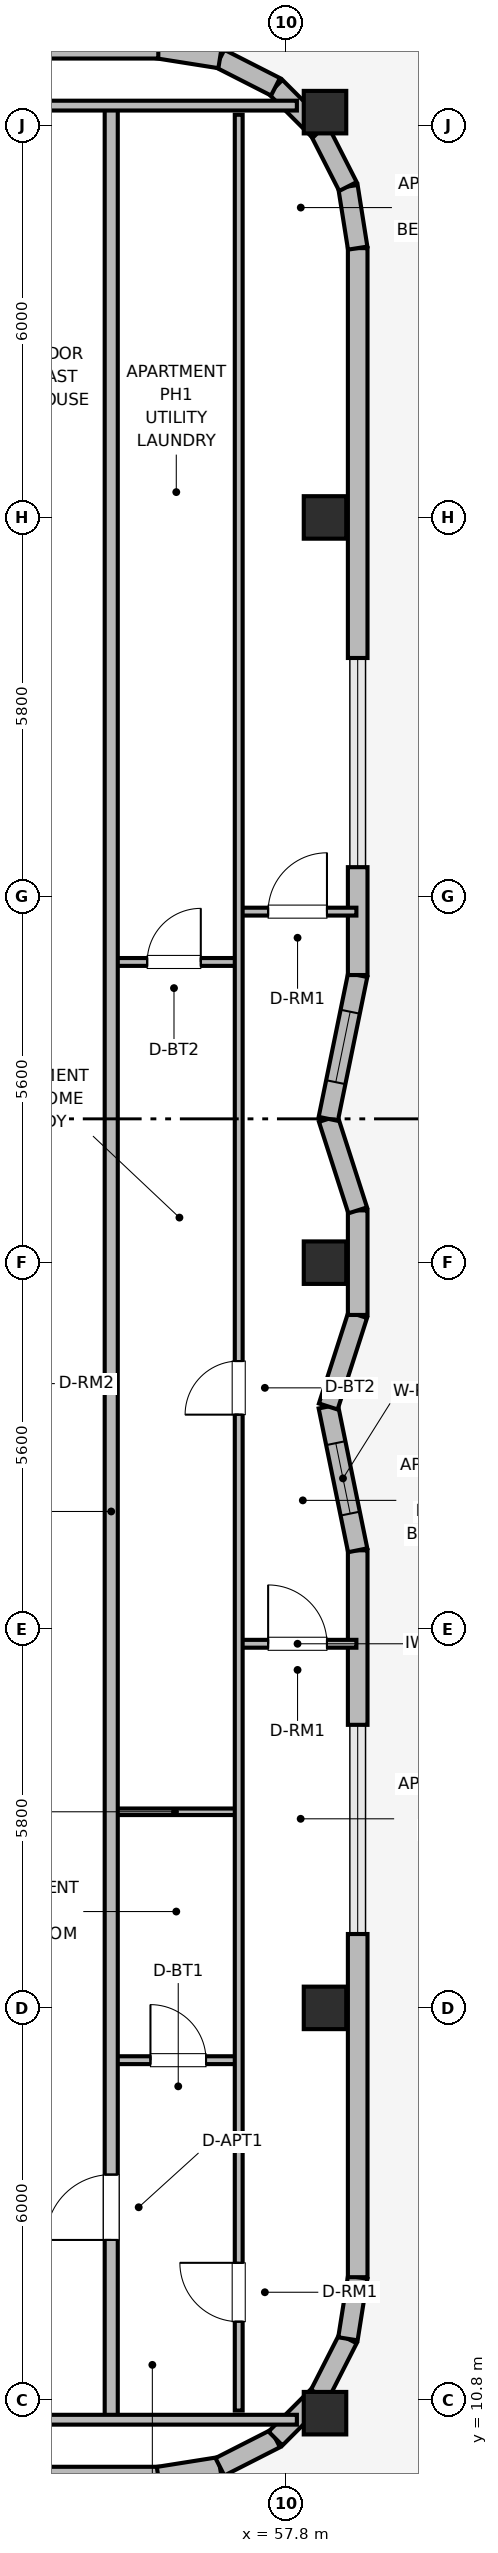
"""IFC4 building model, lengths in metres.
Left out: names, types, materials, properties, quantities, classifications, styles, units other than length and angle.
Written with IfcOpenShell. Run it as: python <this file> out.ifc"""

import sys

from ifc_helpers import new_model, si_unit, direction, frame, frame_2d, origin, origin_2d, place, context, subcontext, project, spatial, rectangle, extrude, element, fill, save


model = new_model("IFC4")
c1 = context("Model", 3, precision=1e-05, world=origin(), true_north=direction((0.0, 1.0)))
c2 = subcontext(c1, "Body", "Model", "MODEL_VIEW")
j1 = project(units=[si_unit("LENGTHUNIT", "METRE"), si_unit("PLANEANGLEUNIT", "RADIAN")], contexts=[c1])
p1 = place(None, origin())
s1 = spatial("IfcSite", under=j1, at=p1, CompositionType="ELEMENT")
p2 = place(p1, origin())
s2 = spatial("IfcBuilding", under=s1, at=p2, CompositionType="ELEMENT")
p3 = place(p2, frame((0.0, 0.0, 297.2)))
s3 = spatial("IfcBuildingStorey", under=s2, at=p3, CompositionType="ELEMENT", Elevation=297.2)
for number, where, z_axis, x_axis in (
    (1, (58.39, 10.6, 0.0), (0.0, 0.0, 1.0), (1.0, 0.0, 0.0)),
    (2, (58.39, 16.8, 0.0), (0.0, 0.0, 1.0), (1.0, 0.0, 0.0)),
    (3, (58.39, 28.2, 0.0), (0.0, 0.0, 1.0), (1.0, 0.0, 0.0)),
    (4, (58.39, 39.6, 0.0), (0.0, 0.0, 1.0), (1.0, 0.0, 0.0)),
    (5, (58.39, 45.8, 0.0), (0.0, 0.0, 1.0), (1.0, 0.0, 0.0)),
):
    element("IfcColumn", number, at=place(p3, frame(where, z_axis=z_axis, x_axis=x_axis)), inside=s3, PredefinedType="COLUMN", context=c2, shape_type="SweptSolid", body=[
        extrude(rectangle(XDim=0.65, YDim=0.65, at=origin_2d()), origin(), (0.0, 0.0, 1.0), 4.8),
    ])
p4 = place(p3, frame((30.21, 9.63, 0.0), z_axis=(0.0, 0.0, 1.0), x_axis=(1.0, 0.0, 0.0)))
e6 = element("IfcWall", 6, at=p4, inside=s3, PredefinedType="SOLIDWALL", context=c2, shape_type="SweptSolid", body=[
    extrude(rectangle(XDim=25.63, YDim=0.3, at=frame_2d((12.815, 0.0))), origin(), (0.0, 0.0, 1.0), 2.6),
])
p5 = place(p4, frame((1.228, 0.0, 0.38)))
e7 = element("IfcOpeningElement", 7, at=p5, cuts=e6, PredefinedType="OPENING", context=c2, shape_type="SweptSolid", body=[
    extrude(rectangle(XDim=2.2, YDim=2.1, at=frame_2d((1.1, 1.05))), frame((0.0, 0.16, 0.0), z_axis=(0.0, -1.0, 0.0), x_axis=(1.0, 0.0, 0.0)), (0.0, 0.0, 1.0), 0.32),
])
p6 = place(p4, frame((6.333, 0.0, 0.38)))
e8 = element("IfcOpeningElement", 8, at=p6, cuts=e6, PredefinedType="OPENING", context=c2, shape_type="SweptSolid", body=[
    extrude(rectangle(XDim=2.2, YDim=2.1, at=frame_2d((1.1, 1.05))), frame((0.0, 0.16, 0.0), z_axis=(0.0, -1.0, 0.0), x_axis=(1.0, 0.0, 0.0)), (0.0, 0.0, 1.0), 0.32),
])
p7 = place(p4, frame((9.337, 0.0, 0.38)))
e9 = element("IfcOpeningElement", 9, at=p7, cuts=e6, PredefinedType="OPENING", context=c2, shape_type="SweptSolid", body=[
    extrude(rectangle(XDim=2.2, YDim=2.1, at=frame_2d((1.1, 1.05))), frame((0.0, 0.16, 0.0), z_axis=(0.0, -1.0, 0.0), x_axis=(1.0, 0.0, 0.0)), (0.0, 0.0, 1.0), 0.32),
])
p8 = place(p4, frame((14.442, 0.0, 0.38)))
e10 = element("IfcOpeningElement", 10, at=p8, cuts=e6, PredefinedType="OPENING", context=c2, shape_type="SweptSolid", body=[
    extrude(rectangle(XDim=2.2, YDim=2.1, at=frame_2d((1.1, 1.05))), frame((0.0, 0.16, 0.0), z_axis=(0.0, -1.0, 0.0), x_axis=(1.0, 0.0, 0.0)), (0.0, 0.0, 1.0), 0.32),
])
p9 = place(p4, frame((17.798, 0.0, 0.38)))
e11 = element("IfcOpeningElement", 11, at=p9, cuts=e6, PredefinedType="OPENING", context=c2, shape_type="SweptSolid", body=[
    extrude(rectangle(XDim=2.2, YDim=2.1, at=frame_2d((1.1, 1.05))), frame((0.0, 0.16, 0.0), z_axis=(0.0, -1.0, 0.0), x_axis=(1.0, 0.0, 0.0)), (0.0, 0.0, 1.0), 0.32),
])
p10 = place(p3, frame((55.84, 9.63, 0.0), z_axis=(0.0, 0.0, 1.0), x_axis=(0.987663181641, 0.156593229835, 0.0)))
e12 = element("IfcWall", 12, at=p10, inside=s3, PredefinedType="SOLIDWALL", context=c2, shape_type="SweptSolid", body=[
    extrude(rectangle(XDim=0.954, YDim=0.3, at=frame_2d((0.477, 0.0))), origin(), (0.0, 0.0, 1.0), 2.6),
])
for number, where, z_axis, x_axis in (
    (13, (56.782, 9.779, 0.0), (0.0, 0.0, 1.0), (0.891, 0.454, 0.0)),
    (14, (57.633, 10.212, 0.0), (0.0, 0.0, 1.0), (0.707, 0.707, 0.0)),
    (15, (58.308, 10.887, 0.0), (0.0, 0.0, 1.0), (0.454, 0.891, 0.0)),
):
    element("IfcWall", number, at=place(p3, frame(where, z_axis=z_axis, x_axis=x_axis)), inside=s3, PredefinedType="SOLIDWALL", context=c2, shape_type="SweptSolid", body=[
        extrude(rectangle(XDim=0.954, YDim=0.3, at=frame_2d((0.477, 0.0))), origin(), (0.0, 0.0, 1.0), 2.6),
    ])
p11 = place(p3, frame((58.741, 11.738, 0.0), z_axis=(0.0, 0.0, 1.0), x_axis=(0.156343617883, 0.987702725088, 0.0)))
e16 = element("IfcWall", 16, at=p11, inside=s3, PredefinedType="SOLIDWALL", context=c2, shape_type="SweptSolid", body=[
    extrude(rectangle(XDim=0.954, YDim=0.3, at=frame_2d((0.477, 0.0))), origin(), (0.0, 0.0, 1.0), 2.6),
])
p12 = place(p3, frame((58.89, 12.68, 0.0), z_axis=(0.0, 0.0, 1.0), x_axis=(0.0, 1.0, 0.0)))
e17 = element("IfcWall", 17, at=p12, inside=s3, PredefinedType="SOLIDWALL", context=c2, shape_type="SweptSolid", body=[
    extrude(rectangle(XDim=5.25, YDim=0.3, at=frame_2d((2.625, 0.0))), origin(), (0.0, 0.0, 1.0), 2.6),
])
p13 = place(p3, frame((58.89, 21.13, 0.0), z_axis=(0.0, 0.0, 1.0), x_axis=(0.0, 1.0, 0.0)))
e18 = element("IfcWall", 18, at=p13, inside=s3, PredefinedType="SOLIDWALL", context=c2, shape_type="SweptSolid", body=[
    extrude(rectangle(XDim=2.67, YDim=0.3, at=frame_2d((1.335, 0.0))), origin(), (0.0, 0.0, 1.0), 2.6),
])
p14 = place(p3, frame((58.89, 23.8, 0.0), z_axis=(0.0, 0.0, 1.0), x_axis=(-0.200379633636, 0.979718328104, 0.0)))
e19 = element("IfcWall", 19, at=p14, inside=s3, PredefinedType="SOLIDWALL", context=c2, shape_type="SweptSolid", body=[
    extrude(rectangle(XDim=2.246, YDim=0.3, at=frame_2d((1.123, 0.0))), origin(), (0.0, 0.0, 1.0), 2.6),
])
p15 = place(p14, frame((0.573, 0.0, 0.79)))
e20 = element("IfcOpeningElement", 20, at=p15, cuts=e19, PredefinedType="OPENING", context=c2, shape_type="SweptSolid", body=[
    extrude(rectangle(XDim=1.1, YDim=1.65, at=frame_2d((0.55, 0.825))), frame((0.0, 0.16, 0.0), z_axis=(0.0, -1.0, 0.0), x_axis=(1.0, 0.0, 0.0)), (0.0, 0.0, 1.0), 0.32),
])
p16 = place(p3, frame((58.44, 26.0, 0.0), z_axis=(0.0, 0.0, 1.0), x_axis=(0.30599843145, 0.952032016242, 0.0)))
e21 = element("IfcWall", 21, at=p16, inside=s3, PredefinedType="SOLIDWALL", context=c2, shape_type="SweptSolid", body=[
    extrude(rectangle(XDim=1.47, YDim=0.3, at=frame_2d((0.735, 0.0))), origin(), (0.0, 0.0, 1.0), 2.6),
])
p17 = place(p3, frame((58.89, 27.4, 0.0), z_axis=(0.0, 0.0, 1.0), x_axis=(0.0, 1.0, 0.0)))
e22 = element("IfcWall", 22, at=p17, inside=s3, PredefinedType="SOLIDWALL", context=c2, shape_type="SweptSolid", body=[
    extrude(rectangle(XDim=1.6, YDim=0.3, at=frame_2d((0.8, 0.0))), origin(), (0.0, 0.0, 1.0), 2.6),
])
p18 = place(p3, frame((58.89, 29.0, 0.0), z_axis=(0.0, 0.0, 1.0), x_axis=(-0.30599843145, 0.952032016242, 0.0)))
e23 = element("IfcWall", 23, at=p18, inside=s3, PredefinedType="SOLIDWALL", context=c2, shape_type="SweptSolid", body=[
    extrude(rectangle(XDim=1.47, YDim=0.3, at=frame_2d((0.735, 0.0))), origin(), (0.0, 0.0, 1.0), 2.6),
])
p19 = place(p3, frame((58.44, 30.4, 0.0), z_axis=(0.0, 0.0, 1.0), x_axis=(0.200358291506, 0.979722692921, 0.0)))
e24 = element("IfcWall", 24, at=p19, inside=s3, PredefinedType="SOLIDWALL", context=c2, shape_type="SweptSolid", body=[
    extrude(rectangle(XDim=2.246, YDim=0.3, at=frame_2d((1.123, 0.0))), origin(), (0.0, 0.0, 1.0), 2.6),
])
p20 = place(p19, frame((0.573, 0.0, 0.79)))
e25 = element("IfcOpeningElement", 25, at=p20, cuts=e24, PredefinedType="OPENING", context=c2, shape_type="SweptSolid", body=[
    extrude(rectangle(XDim=1.1, YDim=1.65, at=frame_2d((0.55, 0.825))), frame((0.0, 0.16, 0.0), z_axis=(0.0, -1.0, 0.0), x_axis=(1.0, 0.0, 0.0)), (0.0, 0.0, 1.0), 0.32),
])
p21 = place(p3, frame((58.89, 32.6, 0.0), z_axis=(0.0, 0.0, 1.0), x_axis=(0.0, 1.0, 0.0)))
e26 = element("IfcWall", 26, at=p21, inside=s3, PredefinedType="SOLIDWALL", context=c2, shape_type="SweptSolid", body=[
    extrude(rectangle(XDim=1.65, YDim=0.3, at=frame_2d((0.825, 0.0))), origin(), (0.0, 0.0, 1.0), 2.6),
])
p22 = place(p3, frame((58.89, 37.45, 0.0), z_axis=(0.0, 0.0, 1.0), x_axis=(0.0, 1.0, 0.0)))
e27 = element("IfcWall", 27, at=p22, inside=s3, PredefinedType="SOLIDWALL", context=c2, shape_type="SweptSolid", body=[
    extrude(rectangle(XDim=6.27, YDim=0.3, at=frame_2d((3.135, 0.0))), origin(), (0.0, 0.0, 1.0), 2.6),
])
p23 = place(p3, frame((58.89, 43.72, 0.0), z_axis=(0.0, 0.0, 1.0), x_axis=(-0.156304114255, 0.987708977314, 0.0)))
e28 = element("IfcWall", 28, at=p23, inside=s3, PredefinedType="SOLIDWALL", context=c2, shape_type="SweptSolid", body=[
    extrude(rectangle(XDim=0.954, YDim=0.3, at=frame_2d((0.477, 0.0))), origin(), (0.0, 0.0, 1.0), 2.6),
])
p24 = place(p3, frame((58.741, 44.663, 0.0), z_axis=(0.0, 0.0, 1.0), x_axis=(-0.45395644796, 0.891023873617, 0.0)))
e29 = element("IfcWall", 29, at=p24, inside=s3, PredefinedType="SOLIDWALL", context=c2, shape_type="SweptSolid", body=[
    extrude(rectangle(XDim=0.954, YDim=0.3, at=frame_2d((0.477, 0.0))), origin(), (0.0, 0.0, 1.0), 2.6),
])
for number, where, z_axis, x_axis in (
    (30, (58.308, 45.513, 0.0), (0.0, 0.0, 1.0), (-0.707, 0.707, 0.0)),
    (31, (57.633, 46.188, 0.0), (0.0, 0.0, 1.0), (-0.891, 0.454, 0.0)),
):
    element("IfcWall", number, at=place(p3, frame(where, z_axis=z_axis, x_axis=x_axis)), inside=s3, PredefinedType="SOLIDWALL", context=c2, shape_type="SweptSolid", body=[
        extrude(rectangle(XDim=0.954, YDim=0.3, at=frame_2d((0.477, 0.0))), origin(), (0.0, 0.0, 1.0), 2.6),
    ])
p25 = place(p3, frame((56.782, 46.621, 0.0), z_axis=(0.0, 0.0, 1.0), x_axis=(-0.987663181641, 0.156593229835, 0.0)))
e32 = element("IfcWall", 32, at=p25, inside=s3, PredefinedType="SOLIDWALL", context=c2, shape_type="SweptSolid", body=[
    extrude(rectangle(XDim=0.954, YDim=0.3, at=frame_2d((0.477, 0.0))), origin(), (0.0, 0.0, 1.0), 2.6),
])
p26 = place(p3, frame((55.84, 46.77, 0.0), z_axis=(0.0, 0.0, 1.0), x_axis=(-1.0, 0.0, 0.0)))
e33 = element("IfcWall", 33, at=p26, inside=s3, PredefinedType="SOLIDWALL", context=c2, shape_type="SweptSolid", body=[
    extrude(rectangle(XDim=4.45, YDim=0.3, at=frame_2d((2.225, 0.0))), origin(), (0.0, 0.0, 1.0), 2.6),
])
p27 = place(p3, frame((55.12, 16.0, 0.0), z_axis=(0.0, 0.0, 1.0), x_axis=(1.0, 0.0, 0.0)))
e34 = element("IfcWall", 34, at=p27, inside=s3, PredefinedType="PARTITIONING", context=c2, shape_type="SweptSolid", body=[
    extrude(rectangle(XDim=1.95, YDim=0.12, at=frame_2d((0.975, 0.0))), origin(), (0.0, 0.0, 1.0), 2.56),
])
p28 = place(p27, frame((0.6, 0.0, 0.0)))
e35 = element("IfcOpeningElement", 35, at=p28, cuts=e34, PredefinedType="OPENING", context=c2, shape_type="SweptSolid", body=[
    extrude(rectangle(XDim=0.85, YDim=2.1, at=frame_2d((0.425, 1.05))), frame((0.0, 0.07, 0.0), z_axis=(0.0, -1.0, 0.0), x_axis=(1.0, 0.0, 0.0)), (0.0, 0.0, 1.0), 0.14),
])
p29 = place(p3, frame((55.12, 19.8, 0.0), z_axis=(0.0, 0.0, 1.0), x_axis=(1.0, 0.0, 0.0)))
e36 = element("IfcWall", 36, at=p29, inside=s3, PredefinedType="PARTITIONING", context=c2, shape_type="SweptSolid", body=[
    extrude(rectangle(XDim=1.95, YDim=0.1, at=frame_2d((0.975, 0.0))), origin(), (0.0, 0.0, 1.0), 2.56),
])
p30 = place(p3, frame((55.12, 32.8, 0.0), z_axis=(0.0, 0.0, 1.0), x_axis=(1.0, 0.0, 0.0)))
e37 = element("IfcWall", 37, at=p30, inside=s3, PredefinedType="PARTITIONING", context=c2, shape_type="SweptSolid", body=[
    extrude(rectangle(XDim=1.95, YDim=0.12, at=frame_2d((0.975, 0.0))), origin(), (0.0, 0.0, 1.0), 2.56),
])
p31 = place(p30, frame((0.55, 0.0, 0.0)))
e38 = element("IfcOpeningElement", 38, at=p31, cuts=e37, PredefinedType="OPENING", context=c2, shape_type="SweptSolid", body=[
    extrude(rectangle(XDim=0.82, YDim=2.08, at=frame_2d((0.41, 1.04))), frame((0.0, 0.07, 0.0), z_axis=(0.0, -1.0, 0.0), x_axis=(1.0, 0.0, 0.0)), (0.0, 0.0, 1.0), 0.14),
])
p32 = place(p3, frame((57.07, 22.37, 0.0), z_axis=(0.0, 0.0, 1.0), x_axis=(1.0, 0.0, 0.0)))
e39 = element("IfcWall", 39, at=p32, inside=s3, PredefinedType="PARTITIONING", context=c2, shape_type="SweptSolid", body=[
    extrude(rectangle(XDim=1.8, YDim=0.12, at=frame_2d((0.9, 0.0))), origin(), (0.0, 0.0, 1.0), 2.56),
])
p33 = place(p32, frame((0.45, 0.0, 0.0)))
e40 = element("IfcOpeningElement", 40, at=p33, cuts=e39, PredefinedType="OPENING", context=c2, shape_type="SweptSolid", body=[
    extrude(rectangle(XDim=0.9, YDim=2.1, at=frame_2d((0.45, 1.05))), frame((0.0, 0.07, 0.0), z_axis=(0.0, -1.0, 0.0), x_axis=(1.0, 0.0, 0.0)), (0.0, 0.0, 1.0), 0.14),
])
p34 = place(p3, frame((57.07, 33.57, 0.0), z_axis=(0.0, 0.0, 1.0), x_axis=(1.0, 0.0, 0.0)))
e41 = element("IfcWall", 41, at=p34, inside=s3, PredefinedType="PARTITIONING", context=c2, shape_type="SweptSolid", body=[
    extrude(rectangle(XDim=1.8, YDim=0.12, at=frame_2d((0.9, 0.0))), origin(), (0.0, 0.0, 1.0), 2.56),
])
p35 = place(p34, frame((0.45, 0.0, 0.0)))
e42 = element("IfcOpeningElement", 42, at=p35, cuts=e41, PredefinedType="OPENING", context=c2, shape_type="SweptSolid", body=[
    extrude(rectangle(XDim=0.9, YDim=2.1, at=frame_2d((0.45, 1.05))), frame((0.0, 0.07, 0.0), z_axis=(0.0, -1.0, 0.0), x_axis=(1.0, 0.0, 0.0)), (0.0, 0.0, 1.0), 0.14),
])
p36 = place(p3, frame((57.07, 10.64, 0.0), z_axis=(0.0, 0.0, 1.0), x_axis=(0.0, 1.0, 0.0)))
e43 = element("IfcWall", 43, at=p36, inside=s3, PredefinedType="PARTITIONING", context=c2, shape_type="SweptSolid", body=[
    extrude(rectangle(XDim=35.12, YDim=0.12, at=frame_2d((17.56, 0.0))), origin(), (0.0, 0.0, 1.0), 2.56),
])
p37 = place(p36, frame((1.36, 0.0, 0.0)))
e44 = element("IfcOpeningElement", 44, at=p37, cuts=e43, PredefinedType="OPENING", context=c2, shape_type="SweptSolid", body=[
    extrude(rectangle(XDim=0.9, YDim=2.1, at=frame_2d((0.45, 1.05))), frame((0.0, 0.07, 0.0), z_axis=(0.0, -1.0, 0.0), x_axis=(1.0, 0.0, 0.0)), (0.0, 0.0, 1.0), 0.14),
])
p38 = place(p36, frame((15.235, 0.0, 0.0)))
e45 = element("IfcOpeningElement", 45, at=p38, cuts=e43, PredefinedType="OPENING", context=c2, shape_type="SweptSolid", body=[
    extrude(rectangle(XDim=0.82, YDim=2.08, at=frame_2d((0.41, 1.04))), frame((0.0, 0.07, 0.0), z_axis=(0.0, -1.0, 0.0), x_axis=(1.0, 0.0, 0.0)), (0.0, 0.0, 1.0), 0.14),
])
p39 = place(p3, frame((55.12, 10.5, 0.0), z_axis=(0.0, 0.0, 1.0), x_axis=(0.0, 1.0, 0.0)))
e46 = element("IfcWall", 46, at=p39, inside=s3, PredefinedType="PARTITIONING", context=c2, shape_type="SweptSolid", body=[
    extrude(rectangle(XDim=35.4, YDim=0.2, at=frame_2d((17.7, 0.0))), origin(), (0.0, 0.0, 1.0), 2.56),
])
p40 = place(p39, frame((2.75, 0.0, 0.0)))
e47 = element("IfcOpeningElement", 47, at=p40, cuts=e46, PredefinedType="OPENING", context=c2, shape_type="SweptSolid", body=[
    extrude(rectangle(XDim=1.0, YDim=2.15, at=frame_2d((0.5, 1.075))), frame((0.0, 0.11, 0.0), z_axis=(0.0, -1.0, 0.0), x_axis=(1.0, 0.0, 0.0)), (0.0, 0.0, 1.0), 0.22),
])
for number, where, z_axis, x_axis in (
    (48, (53.1, 10.5, 0.0), (0.0, 0.0, 1.0), (1.0, 0.0, 0.0)),
    (49, (53.1, 45.9, 0.0), (0.0, 0.0, 1.0), (1.0, 0.0, 0.0)),
):
    element("IfcWall", number, at=place(p3, frame(where, z_axis=z_axis, x_axis=x_axis)), inside=s3, PredefinedType="PARTITIONING", context=c2, shape_type="SweptSolid", body=[
        extrude(rectangle(XDim=4.86, YDim=0.15, at=frame_2d((2.43, 0.0))), origin(), (0.0, 0.0, 1.0), 2.56),
    ])
p41 = place(p15, origin())
e50 = element("IfcWindow", 50, at=p41, inside=s3, PartitioningType="SINGLE_PANEL", PredefinedType="WINDOW", context=c2, shape_type="SweptSolid", body=[
    extrude(rectangle(XDim=1.1, YDim=1.65, at=frame_2d((0.55, 0.825))), frame((0.0, 0.03, 0.0), z_axis=(0.0, -1.0, 0.0), x_axis=(1.0, 0.0, 0.0)), (0.0, 0.0, 1.0), 0.06),
])
fill(e20, e50)
p42 = place(p20, origin())
e51 = element("IfcWindow", 51, at=p42, inside=s3, PartitioningType="SINGLE_PANEL", PredefinedType="WINDOW", context=c2, shape_type="SweptSolid", body=[
    extrude(rectangle(XDim=1.1, YDim=1.65, at=frame_2d((0.55, 0.825))), frame((0.0, 0.03, 0.0), z_axis=(0.0, -1.0, 0.0), x_axis=(1.0, 0.0, 0.0)), (0.0, 0.0, 1.0), 0.06),
])
fill(e25, e51)
p43 = place(p28, origin())
e52 = element("IfcDoor", 52, at=p43, inside=s3, OperationType="SINGLE_SWING_LEFT", PredefinedType="DOOR", context=c2, shape_type="SweptSolid", body=[
    extrude(rectangle(XDim=0.85, YDim=2.1, at=frame_2d((0.425, 1.05))), frame((0.0, 0.025, 0.0), z_axis=(0.0, -1.0, 0.0), x_axis=(1.0, 0.0, 0.0)), (0.0, 0.0, 1.0), 0.05),
])
fill(e35, e52)
p44 = place(p31, origin())
e53 = element("IfcDoor", 53, at=p44, inside=s3, OperationType="SINGLE_SWING_RIGHT", PredefinedType="DOOR", context=c2, shape_type="SweptSolid", body=[
    extrude(rectangle(XDim=0.82, YDim=2.08, at=frame_2d((0.41, 1.04))), frame((0.0, 0.025, 0.0), z_axis=(0.0, -1.0, 0.0), x_axis=(1.0, 0.0, 0.0)), (0.0, 0.0, 1.0), 0.05),
])
fill(e38, e53)
p45 = place(p33, origin())
e54 = element("IfcDoor", 54, at=p45, inside=s3, OperationType="SINGLE_SWING_LEFT", PredefinedType="DOOR", context=c2, shape_type="SweptSolid", body=[
    extrude(rectangle(XDim=0.9, YDim=2.1, at=frame_2d((0.45, 1.05))), frame((0.0, 0.025, 0.0), z_axis=(0.0, -1.0, 0.0), x_axis=(1.0, 0.0, 0.0)), (0.0, 0.0, 1.0), 0.05),
])
fill(e40, e54)
p46 = place(p35, origin())
e55 = element("IfcDoor", 55, at=p46, inside=s3, OperationType="SINGLE_SWING_RIGHT", PredefinedType="DOOR", context=c2, shape_type="SweptSolid", body=[
    extrude(rectangle(XDim=0.9, YDim=2.1, at=frame_2d((0.45, 1.05))), frame((0.0, 0.025, 0.0), z_axis=(0.0, -1.0, 0.0), x_axis=(1.0, 0.0, 0.0)), (0.0, 0.0, 1.0), 0.05),
])
fill(e42, e55)
p47 = place(p37, origin())
e56 = element("IfcDoor", 56, at=p47, inside=s3, OperationType="SINGLE_SWING_RIGHT", PredefinedType="DOOR", context=c2, shape_type="SweptSolid", body=[
    extrude(rectangle(XDim=0.9, YDim=2.1, at=frame_2d((0.45, 1.05))), frame((0.0, 0.025, 0.0), z_axis=(0.0, -1.0, 0.0), x_axis=(1.0, 0.0, 0.0)), (0.0, 0.0, 1.0), 0.05),
])
fill(e44, e56)
p48 = place(p38, origin())
e57 = element("IfcDoor", 57, at=p48, inside=s3, OperationType="SINGLE_SWING_LEFT", PredefinedType="DOOR", context=c2, shape_type="SweptSolid", body=[
    extrude(rectangle(XDim=0.82, YDim=2.08, at=frame_2d((0.41, 1.04))), frame((0.0, 0.025, 0.0), z_axis=(0.0, -1.0, 0.0), x_axis=(1.0, 0.0, 0.0)), (0.0, 0.0, 1.0), 0.05),
])
fill(e45, e57)
p49 = place(p40, origin())
e58 = element("IfcDoor", 58, at=p49, inside=s3, OperationType="SINGLE_SWING_LEFT", PredefinedType="DOOR", context=c2, shape_type="SweptSolid", body=[
    extrude(rectangle(XDim=1.0, YDim=2.15, at=frame_2d((0.5, 1.075))), frame((0.0, 0.025, 0.0), z_axis=(0.0, -1.0, 0.0), x_axis=(1.0, 0.0, 0.0)), (0.0, 0.0, 1.0), 0.05),
])
fill(e47, e58)
save(model, sys.argv[1])
